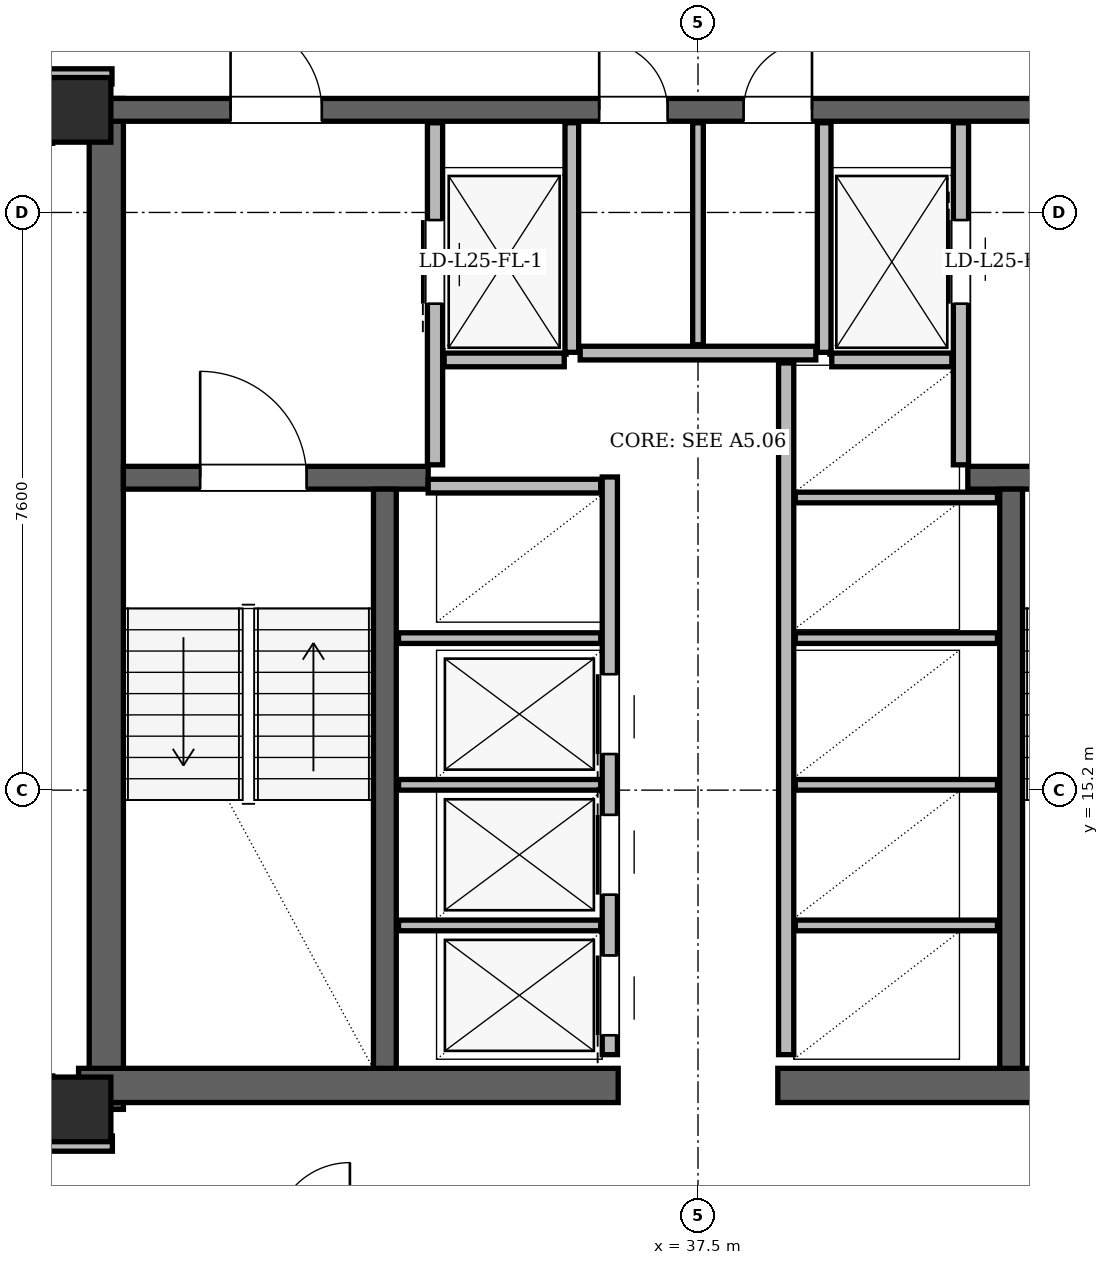
"""IFC4 building model, lengths in metres.
Left out: names, types, materials, properties, quantities, classifications, styles, units other than length and angle.
Written with IfcOpenShell. Run it as: python <this file> out.ifc"""

import sys

from ifc_helpers import new_model, si_unit, direction, frame, frame_2d, origin, origin_2d, place, context, subcontext, project, spatial, rectangle, hollow_rectangle, extrude, element, fill, save


model = new_model("IFC4")
c1 = context("Model", 3, precision=1e-05, world=origin(), true_north=direction((0.0, 1.0)))
c2 = subcontext(c1, "Body", "Model", "MODEL_VIEW")
j1 = project(units=[si_unit("LENGTHUNIT", "METRE"), si_unit("PLANEANGLEUNIT", "RADIAN")], contexts=[c1])
p1 = place(None, origin())
s1 = spatial("IfcSite", under=j1, at=p1, CompositionType="ELEMENT")
p2 = place(p1, origin())
s2 = spatial("IfcBuilding", under=s1, at=p2, CompositionType="ELEMENT")
p3 = place(p2, frame((0.0, 0.0, 96.9)))
s3 = spatial("IfcBuildingStorey", under=s2, at=p3, CompositionType="ELEMENT", Elevation=96.9)
for number, where, z_axis, x_axis in (
    (1, (29.35, 11.0, 0.0), (0.0, 0.0, 1.0), (1.0, 0.0, 0.0)),
    (2, (29.35, 24.15, 0.0), (0.0, 0.0, 1.0), (1.0, 0.0, 0.0)),
):
    element("IfcColumn", number, at=place(p3, frame(where, z_axis=z_axis, x_axis=x_axis)), inside=s3, PredefinedType="COLUMN", context=c2, shape_type="SweptSolid", body=[
        extrude(hollow_rectangle(XDim=0.85, YDim=0.85, WallThickness=0.07, at=origin_2d()), origin(), (0.0, 0.0, 1.0), 3.6),
    ])
p4 = place(p3, frame((29.715, 11.0, 0.0), z_axis=(0.0, 0.0, 1.0), x_axis=(0.0, 1.0, 0.0)))
e3 = element("IfcWall", 3, at=p4, inside=s3, PredefinedType="SHEAR", context=c2, shape_type="SweptSolid", body=[
    extrude(rectangle(XDim=13.3, YDim=0.45, at=frame_2d((6.65, 0.0))), origin(), (0.0, 0.0, 1.0), 3.36),
])
for number, where, z_axis, x_axis in (
    (4, (29.35, 11.315, 0.0), (0.0, 0.0, 1.0), (1.0, 0.0, 0.0)),
    (5, (38.55, 11.315, 0.0), (0.0, 0.0, 1.0), (1.0, 0.0, 0.0)),
):
    element("IfcWall", number, at=place(p3, frame(where, z_axis=z_axis, x_axis=x_axis)), inside=s3, PredefinedType="SHEAR", context=c2, shape_type="SweptSolid", body=[
        extrude(rectangle(XDim=7.1, YDim=0.45, at=frame_2d((3.55, 0.0))), origin(), (0.0, 0.0, 1.0), 3.36),
    ])
p5 = place(p3, frame((29.65, 24.15, 0.0), z_axis=(0.0, 0.0, 1.0), x_axis=(1.0, 0.0, 0.0)))
e6 = element("IfcWall", 6, at=p5, inside=s3, PredefinedType="SHEAR", context=c2, shape_type="SweptSolid", body=[
    extrude(rectangle(XDim=15.7, YDim=0.3, at=frame_2d((7.85, 0.0))), origin(), (0.0, 0.0, 1.0), 3.36),
])
p6 = place(p5, frame((1.7, 0.0, 0.0)))
e7 = element("IfcOpeningElement", 7, at=p6, cuts=e6, PredefinedType="OPENING", context=c2, shape_type="SweptSolid", body=[
    extrude(rectangle(XDim=1.2, YDim=2.2, at=frame_2d((0.6, 1.1))), frame((0.0, 0.15, 0.0), z_axis=(0.0, -1.0, 0.0), x_axis=(1.0, 0.0, 0.0)), (0.0, 0.0, 1.0), 0.3),
])
p7 = place(p5, frame((12.8, 0.0, 0.0)))
e8 = element("IfcOpeningElement", 8, at=p7, cuts=e6, PredefinedType="OPENING", context=c2, shape_type="SweptSolid", body=[
    extrude(rectangle(XDim=1.2, YDim=2.2, at=frame_2d((0.6, 1.1))), frame((0.0, 0.15, 0.0), z_axis=(0.0, -1.0, 0.0), x_axis=(1.0, 0.0, 0.0)), (0.0, 0.0, 1.0), 0.3),
])
p8 = place(p5, frame((6.55, 0.0, 0.0)))
e9 = element("IfcOpeningElement", 9, at=p8, cuts=e6, PredefinedType="OPENING", context=c2, shape_type="SweptSolid", body=[
    extrude(rectangle(XDim=0.9, YDim=2.05, at=frame_2d((0.45, 1.025))), frame((0.0, 0.15, 0.0), z_axis=(0.0, -1.0, 0.0), x_axis=(1.0, 0.0, 0.0)), (0.0, 0.0, 1.0), 0.3),
])
p9 = place(p5, frame((8.45, 0.0, 0.0)))
e10 = element("IfcOpeningElement", 10, at=p9, cuts=e6, PredefinedType="OPENING", context=c2, shape_type="SweptSolid", body=[
    extrude(rectangle(XDim=0.9, YDim=2.05, at=frame_2d((0.45, 1.025))), frame((0.0, 0.15, 0.0), z_axis=(0.0, -1.0, 0.0), x_axis=(1.0, 0.0, 0.0)), (0.0, 0.0, 1.0), 0.3),
])
p10 = place(p3, frame((29.94, 19.31, 0.0), z_axis=(0.0, 0.0, 1.0), x_axis=(1.0, 0.0, 0.0)))
e11 = element("IfcWall", 11, at=p10, inside=s3, PredefinedType="SHEAR", context=c2, shape_type="SweptSolid", body=[
    extrude(rectangle(XDim=4.01, YDim=0.3, at=frame_2d((2.005, 0.0))), origin(), (0.0, 0.0, 1.0), 3.36),
])
p11 = place(p10, frame((1.01, 0.0, 0.0)))
e12 = element("IfcOpeningElement", 12, at=p11, cuts=e11, PredefinedType="OPENING", context=c2, shape_type="SweptSolid", body=[
    extrude(rectangle(XDim=1.4, YDim=2.2, at=frame_2d((0.7, 1.1))), frame((0.0, 0.15, 0.0), z_axis=(0.0, -1.0, 0.0), x_axis=(1.0, 0.0, 0.0)), (0.0, 0.0, 1.0), 0.3),
])
p12 = place(p3, frame((41.05, 19.31, 0.0), z_axis=(0.0, 0.0, 1.0), x_axis=(1.0, 0.0, 0.0)))
e13 = element("IfcWall", 13, at=p12, inside=s3, PredefinedType="SHEAR", context=c2, shape_type="SweptSolid", body=[
    extrude(rectangle(XDim=4.01, YDim=0.3, at=frame_2d((2.005, 0.0))), origin(), (0.0, 0.0, 1.0), 3.36),
])
p13 = place(p12, frame((1.6, 0.0, 0.0)))
e14 = element("IfcOpeningElement", 14, at=p13, cuts=e13, PredefinedType="OPENING", context=c2, shape_type="SweptSolid", body=[
    extrude(rectangle(XDim=1.4, YDim=2.2, at=frame_2d((0.7, 1.1))), frame((0.0, 0.15, 0.0), z_axis=(0.0, -1.0, 0.0), x_axis=(1.0, 0.0, 0.0)), (0.0, 0.0, 1.0), 0.3),
])
for number, where, z_axis, x_axis in (
    (15, (33.38, 11.54, 0.0), (0.0, 0.0, 1.0), (0.0, 1.0, 0.0)),
    (16, (41.62, 11.54, 0.0), (0.0, 0.0, 1.0), (0.0, 1.0, 0.0)),
):
    element("IfcWall", number, at=place(p3, frame(where, z_axis=z_axis, x_axis=x_axis)), inside=s3, PredefinedType="SHEAR", context=c2, shape_type="SweptSolid", body=[
        extrude(rectangle(XDim=7.62, YDim=0.3, at=frame_2d((3.81, 0.0))), origin(), (0.0, 0.0, 1.0), 3.36),
    ])
p14 = place(p3, frame((31.472, 43.462, 0.0), z_axis=(0.0, 0.0, 1.0), x_axis=(-0.499995749028, -0.86602785807, 0.0)))
e17 = element("IfcWall", 17, at=p14, inside=s3, PredefinedType="SOLIDWALL", context=c2, shape_type="SweptSolid", body=[
    extrude(rectangle(XDim=34.437, YDim=0.34, at=frame_2d((17.218, 0.0))), origin(), (0.0, 0.0, 1.0), 2.578),
])
p15 = place(p14, frame((6.469, 0.0, 0.0)))
e18 = element("IfcOpeningElement", 18, at=p15, cuts=e17, PredefinedType="OPENING", context=c2, shape_type="SweptSolid", body=[
    extrude(rectangle(XDim=1.3, YDim=2.2, at=frame_2d((0.65, 1.1))), frame((0.0, 0.17, 0.0), z_axis=(0.0, -1.0, 0.0), x_axis=(1.0, 0.0, 0.0)), (0.0, 0.0, 1.0), 0.34),
])
p16 = place(p14, frame((24.902, 0.0, 0.0)))
e19 = element("IfcOpeningElement", 19, at=p16, cuts=e17, PredefinedType="OPENING", context=c2, shape_type="SweptSolid", body=[
    extrude(rectangle(XDim=1.5, YDim=2.2, at=frame_2d((0.75, 1.1))), frame((0.0, 0.17, 0.0), z_axis=(0.0, -1.0, 0.0), x_axis=(1.0, 0.0, 0.0)), (0.0, 0.0, 1.0), 0.34),
])
p17 = place(p14, frame((30.75, 0.0, 0.85)))
e20 = element("IfcOpeningElement", 20, at=p17, cuts=e17, PredefinedType="OPENING", context=c2, shape_type="SweptSolid", body=[
    extrude(rectangle(XDim=1.4, YDim=1.6, at=frame_2d((0.7, 0.8))), frame((0.0, 0.17, 0.0), z_axis=(0.0, -1.0, 0.0), x_axis=(1.0, 0.0, 0.0)), (0.0, 0.0, 1.0), 0.34),
])
p18 = place(p14, frame((11.337, 0.0, 0.85)))
e21 = element("IfcOpeningElement", 21, at=p18, cuts=e17, PredefinedType="OPENING", context=c2, shape_type="SweptSolid", body=[
    extrude(rectangle(XDim=2.8, YDim=1.618, at=frame_2d((1.4, 0.809))), frame((0.0, 0.17, 0.0), z_axis=(0.0, -1.0, 0.0), x_axis=(1.0, 0.0, 0.0)), (0.0, 0.0, 1.0), 0.34),
])
p19 = place(p14, frame((18.111, 0.0, 0.85)))
e22 = element("IfcOpeningElement", 22, at=p19, cuts=e17, PredefinedType="OPENING", context=c2, shape_type="SweptSolid", body=[
    extrude(rectangle(XDim=2.2, YDim=1.618, at=frame_2d((1.1, 0.809))), frame((0.0, 0.17, 0.0), z_axis=(0.0, -1.0, 0.0), x_axis=(1.0, 0.0, 0.0)), (0.0, 0.0, 1.0), 0.34),
])
p20 = place(p14, frame((3.044, 0.0, 0.85)))
e23 = element("IfcOpeningElement", 23, at=p20, cuts=e17, PredefinedType="OPENING", context=c2, shape_type="SweptSolid", body=[
    extrude(rectangle(XDim=1.2, YDim=1.48, at=frame_2d((0.6, 0.74))), frame((0.0, 0.17, 0.0), z_axis=(0.0, -1.0, 0.0), x_axis=(1.0, 0.0, 0.0)), (0.0, 0.0, 1.0), 0.34),
])
p21 = place(p3, frame((34.04, 19.48, 0.0), z_axis=(0.0, 0.0, 1.0), x_axis=(0.0, 1.0, 0.0)))
e24 = element("IfcWall", 24, at=p21, inside=s3, PredefinedType="PARTITIONING", context=c2, shape_type="SweptSolid", body=[
    extrude(rectangle(XDim=4.5, YDim=0.2, at=frame_2d((2.25, 0.0))), origin(), (0.0, 0.0, 1.0), 2.4),
])
p22 = place(p21, frame((2.12, 0.0, 0.0)))
e25 = element("IfcOpeningElement", 25, at=p22, cuts=e24, PredefinedType="OPENING", context=c2, shape_type="SweptSolid", body=[
    extrude(rectangle(XDim=1.1, YDim=2.2, at=frame_2d((0.55, 1.1))), frame((0.0, 0.1, 0.0), z_axis=(0.0, -1.0, 0.0), x_axis=(1.0, 0.0, 0.0)), (0.0, 0.0, 1.0), 0.2),
])
p23 = place(p3, frame((35.84, 20.96, 0.0), z_axis=(0.0, 0.0, 1.0), x_axis=(0.0, 1.0, 0.0)))
e26 = element("IfcWall", 26, at=p23, inside=s3, PredefinedType="PARTITIONING", context=c2, shape_type="SweptSolid", body=[
    extrude(rectangle(XDim=3.02, YDim=0.18, at=frame_2d((1.51, 0.0))), origin(), (0.0, 0.0, 1.0), 2.4),
])
p24 = place(p3, frame((34.16, 20.86, 0.0), z_axis=(0.0, 0.0, 1.0), x_axis=(1.0, 0.0, 0.0)))
e27 = element("IfcWall", 27, at=p24, inside=s3, PredefinedType="PARTITIONING", context=c2, shape_type="SweptSolid", body=[
    extrude(rectangle(XDim=1.58, YDim=0.18, at=frame_2d((0.79, 0.0))), origin(), (0.0, 0.0, 1.0), 3.36),
])
p25 = place(p3, frame((40.96, 19.48, 0.0), z_axis=(0.0, 0.0, 1.0), x_axis=(0.0, 1.0, 0.0)))
e28 = element("IfcWall", 28, at=p25, inside=s3, PredefinedType="PARTITIONING", context=c2, shape_type="SweptSolid", body=[
    extrude(rectangle(XDim=4.5, YDim=0.2, at=frame_2d((2.25, 0.0))), origin(), (0.0, 0.0, 1.0), 2.4),
])
p26 = place(p25, frame((2.12, 0.0, 0.0)))
e29 = element("IfcOpeningElement", 29, at=p26, cuts=e28, PredefinedType="OPENING", context=c2, shape_type="SweptSolid", body=[
    extrude(rectangle(XDim=1.1, YDim=2.2, at=frame_2d((0.55, 1.1))), frame((0.0, 0.1, 0.0), z_axis=(0.0, -1.0, 0.0), x_axis=(1.0, 0.0, 0.0)), (0.0, 0.0, 1.0), 0.2),
])
p27 = place(p3, frame((39.16, 20.96, 0.0), z_axis=(0.0, 0.0, 1.0), x_axis=(0.0, 1.0, 0.0)))
e30 = element("IfcWall", 30, at=p27, inside=s3, PredefinedType="PARTITIONING", context=c2, shape_type="SweptSolid", body=[
    extrude(rectangle(XDim=3.02, YDim=0.18, at=frame_2d((1.51, 0.0))), origin(), (0.0, 0.0, 1.0), 2.4),
])
p28 = place(p3, frame((39.26, 20.86, 0.0), z_axis=(0.0, 0.0, 1.0), x_axis=(1.0, 0.0, 0.0)))
e31 = element("IfcWall", 31, at=p28, inside=s3, PredefinedType="PARTITIONING", context=c2, shape_type="SweptSolid", body=[
    extrude(rectangle(XDim=1.58, YDim=0.18, at=frame_2d((0.79, 0.0))), origin(), (0.0, 0.0, 1.0), 3.36),
])
p29 = place(p3, frame((36.34, 11.72, 0.0), z_axis=(0.0, 0.0, 1.0), x_axis=(0.0, 1.0, 0.0)))
e32 = element("IfcWall", 32, at=p29, inside=s3, PredefinedType="PARTITIONING", context=c2, shape_type="SweptSolid", body=[
    extrude(rectangle(XDim=7.6, YDim=0.2, at=frame_2d((3.8, 0.0))), origin(), (0.0, 0.0, 1.0), 3.36),
])
p30 = place(p29, frame((0.255, 0.0, 0.0)))
e33 = element("IfcOpeningElement", 33, at=p30, cuts=e32, PredefinedType="OPENING", context=c2, shape_type="SweptSolid", body=[
    extrude(rectangle(XDim=1.05, YDim=2.15, at=frame_2d((0.525, 1.075))), frame((0.0, 0.1, 0.0), z_axis=(0.0, -1.0, 0.0), x_axis=(1.0, 0.0, 0.0)), (0.0, 0.0, 1.0), 0.2),
])
p31 = place(p29, frame((2.105, 0.0, 0.0)))
e34 = element("IfcOpeningElement", 34, at=p31, cuts=e32, PredefinedType="OPENING", context=c2, shape_type="SweptSolid", body=[
    extrude(rectangle(XDim=1.05, YDim=2.15, at=frame_2d((0.525, 1.075))), frame((0.0, 0.1, 0.0), z_axis=(0.0, -1.0, 0.0), x_axis=(1.0, 0.0, 0.0)), (0.0, 0.0, 1.0), 0.2),
])
p32 = place(p29, frame((3.955, 0.0, 0.0)))
e35 = element("IfcOpeningElement", 35, at=p32, cuts=e32, PredefinedType="OPENING", context=c2, shape_type="SweptSolid", body=[
    extrude(rectangle(XDim=1.05, YDim=2.15, at=frame_2d((0.525, 1.075))), frame((0.0, 0.1, 0.0), z_axis=(0.0, -1.0, 0.0), x_axis=(1.0, 0.0, 0.0)), (0.0, 0.0, 1.0), 0.2),
])
p33 = place(p3, frame((33.95, 19.2, 0.0), z_axis=(0.0, 0.0, 1.0), x_axis=(1.0, 0.0, 0.0)))
e36 = element("IfcWall", 36, at=p33, inside=s3, PredefinedType="PARTITIONING", context=c2, shape_type="SweptSolid", body=[
    extrude(rectangle(XDim=2.27, YDim=0.18, at=frame_2d((1.135, 0.0))), origin(), (0.0, 0.0, 1.0), 3.36),
])
for number, where, z_axis, x_axis in (
    (37, (33.56, 13.42, 0.0), (0.0, 0.0, 1.0), (1.0, 0.0, 0.0)),
    (38, (33.56, 15.27, 0.0), (0.0, 0.0, 1.0), (1.0, 0.0, 0.0)),
    (39, (33.56, 17.2, 0.0), (0.0, 0.0, 1.0), (1.0, 0.0, 0.0)),
):
    element("IfcWall", number, at=place(p3, frame(where, z_axis=z_axis, x_axis=x_axis)), inside=s3, PredefinedType="PARTITIONING", context=c2, shape_type="SweptSolid", body=[
        extrude(rectangle(XDim=2.66, YDim=0.14, at=frame_2d((1.33, 0.0))), origin(), (0.0, 0.0, 1.0), 3.36),
    ])
p34 = place(p3, frame((38.66, 11.72, 0.0), z_axis=(0.0, 0.0, 1.0), x_axis=(0.0, 1.0, 0.0)))
e40 = element("IfcWall", 40, at=p34, inside=s3, PredefinedType="PARTITIONING", context=c2, shape_type="SweptSolid", body=[
    extrude(rectangle(XDim=9.1, YDim=0.2, at=frame_2d((4.55, 0.0))), origin(), (0.0, 0.0, 1.0), 3.36),
])
for number, where, z_axis, x_axis in (
    (41, (38.78, 13.42, 0.0), (0.0, 0.0, 1.0), (1.0, 0.0, 0.0)),
    (42, (38.78, 15.27, 0.0), (0.0, 0.0, 1.0), (1.0, 0.0, 0.0)),
    (43, (38.78, 17.2, 0.0), (0.0, 0.0, 1.0), (1.0, 0.0, 0.0)),
    (44, (38.78, 19.05, 0.0), (0.0, 0.0, 1.0), (1.0, 0.0, 0.0)),
):
    element("IfcWall", number, at=place(p3, frame(where, z_axis=z_axis, x_axis=x_axis)), inside=s3, PredefinedType="PARTITIONING", context=c2, shape_type="SweptSolid", body=[
        extrude(rectangle(XDim=2.66, YDim=0.14, at=frame_2d((1.33, 0.0))), origin(), (0.0, 0.0, 1.0), 3.36),
    ])
p35 = place(p3, frame((35.95, 20.95, 0.0), z_axis=(0.0, 0.0, 1.0), x_axis=(1.0, 0.0, 0.0)))
e45 = element("IfcWall", 45, at=p35, inside=s3, PredefinedType="PARTITIONING", context=c2, shape_type="SweptSolid", body=[
    extrude(rectangle(XDim=3.1, YDim=0.18, at=frame_2d((1.55, 0.0))), origin(), (0.0, 0.0, 1.0), 3.36),
])
p36 = place(p3, frame((37.5, 21.06, 0.0), z_axis=(0.0, 0.0, 1.0), x_axis=(0.0, 1.0, 0.0)))
e46 = element("IfcWall", 46, at=p36, inside=s3, PredefinedType="PARTITIONING", context=c2, shape_type="SweptSolid", body=[
    extrude(rectangle(XDim=2.92, YDim=0.14, at=frame_2d((1.46, 0.0))), origin(), (0.0, 0.0, 1.0), 2.4),
])
p37 = place(p3, frame((28.905, 10.55, 0.0), z_axis=(0.0, 0.0, 1.0), x_axis=(1.0, 0.0, 0.0)))
e47 = element("IfcWall", 47, at=p37, inside=s3, PredefinedType="PARTITIONING", context=c2, shape_type="SweptSolid", body=[
    extrude(rectangle(XDim=0.89, YDim=0.2, at=frame_2d((0.445, 0.0))), origin(), (0.0, 0.0, 1.0), 3.36),
])
p38 = place(p3, frame((28.91, 24.59, 0.0), z_axis=(0.0, 0.0, 1.0), x_axis=(1.0, 0.0, 0.0)))
e48 = element("IfcWall", 48, at=p38, inside=s3, PredefinedType="PARTITIONING", context=c2, shape_type="SweptSolid", body=[
    extrude(rectangle(XDim=0.88, YDim=0.2, at=frame_2d((0.44, 0.0))), origin(), (0.0, 0.0, 1.0), 2.814),
])
p39 = place(p3, frame((28.91, 10.654, 0.0), z_axis=(0.0, 0.0, 1.0), x_axis=(0.0, 1.0, 0.0)))
e49 = element("IfcWall", 49, at=p39, inside=s3, PredefinedType="PARTITIONING", context=c2, shape_type="SweptSolid", body=[
    extrude(rectangle(XDim=0.786, YDim=0.2, at=frame_2d((0.393, 0.0))), origin(), (0.0, 0.0, 1.0), 2.814),
])
p40 = place(p3, frame((28.91, 23.71, 0.0), z_axis=(0.0, 0.0, 1.0), x_axis=(0.0, 1.0, 0.0)))
e50 = element("IfcWall", 50, at=p40, inside=s3, PredefinedType="PARTITIONING", context=c2, shape_type="SweptSolid", body=[
    extrude(rectangle(XDim=0.61, YDim=0.2, at=frame_2d((0.305, 0.0))), origin(), (0.0, 0.0, 1.0), 3.36),
])
p41 = place(p22, origin())
e51 = element("IfcDoor", 51, at=p41, inside=s3, OperationType="SLIDING_TO_LEFT", PredefinedType="DOOR", context=c2, shape_type="SweptSolid", body=[
    extrude(rectangle(XDim=1.1, YDim=2.2, at=frame_2d((0.55, 1.1))), frame((0.0, 0.025, 0.0), z_axis=(0.0, -1.0, 0.0), x_axis=(1.0, 0.0, 0.0)), (0.0, 0.0, 1.0), 0.05),
])
fill(e25, e51)
p42 = place(p26, origin())
e52 = element("IfcDoor", 52, at=p42, inside=s3, OperationType="SLIDING_TO_RIGHT", PredefinedType="DOOR", context=c2, shape_type="SweptSolid", body=[
    extrude(rectangle(XDim=1.1, YDim=2.2, at=frame_2d((0.55, 1.1))), frame((0.0, 0.025, 0.0), z_axis=(0.0, -1.0, 0.0), x_axis=(1.0, 0.0, 0.0)), (0.0, 0.0, 1.0), 0.05),
])
fill(e29, e52)
p43 = place(p30, origin())
e53 = element("IfcDoor", 53, at=p43, inside=s3, OperationType="SLIDING_TO_LEFT", PredefinedType="DOOR", context=c2, shape_type="SweptSolid", body=[
    extrude(rectangle(XDim=1.05, YDim=2.15, at=frame_2d((0.525, 1.075))), frame((0.0, 0.025, 0.0), z_axis=(0.0, -1.0, 0.0), x_axis=(1.0, 0.0, 0.0)), (0.0, 0.0, 1.0), 0.05),
])
fill(e33, e53)
p44 = place(p31, origin())
e54 = element("IfcDoor", 54, at=p44, inside=s3, OperationType="SLIDING_TO_RIGHT", PredefinedType="DOOR", context=c2, shape_type="SweptSolid", body=[
    extrude(rectangle(XDim=1.05, YDim=2.15, at=frame_2d((0.525, 1.075))), frame((0.0, 0.025, 0.0), z_axis=(0.0, -1.0, 0.0), x_axis=(1.0, 0.0, 0.0)), (0.0, 0.0, 1.0), 0.05),
])
fill(e34, e54)
p45 = place(p32, origin())
e55 = element("IfcDoor", 55, at=p45, inside=s3, OperationType="SLIDING_TO_LEFT", PredefinedType="DOOR", context=c2, shape_type="SweptSolid", body=[
    extrude(rectangle(XDim=1.05, YDim=2.15, at=frame_2d((0.525, 1.075))), frame((0.0, 0.025, 0.0), z_axis=(0.0, -1.0, 0.0), x_axis=(1.0, 0.0, 0.0)), (0.0, 0.0, 1.0), 0.05),
])
fill(e35, e55)
p46 = place(p11, origin())
e56 = element("IfcDoor", 56, at=p46, inside=s3, OperationType="SINGLE_SWING_LEFT", PredefinedType="DOOR", context=c2, shape_type="SweptSolid", body=[
    extrude(rectangle(XDim=1.4, YDim=2.2, at=frame_2d((0.7, 1.1))), frame((0.0, 0.025, 0.0), z_axis=(0.0, -1.0, 0.0), x_axis=(1.0, 0.0, 0.0)), (0.0, 0.0, 1.0), 0.05),
])
fill(e12, e56)
p47 = place(p6, origin())
e57 = element("IfcDoor", 57, at=p47, inside=s3, OperationType="SINGLE_SWING_LEFT", PredefinedType="DOOR", context=c2, shape_type="SweptSolid", body=[
    extrude(rectangle(XDim=1.2, YDim=2.2, at=frame_2d((0.6, 1.1))), frame((0.0, 0.025, 0.0), z_axis=(0.0, -1.0, 0.0), x_axis=(1.0, 0.0, 0.0)), (0.0, 0.0, 1.0), 0.05),
])
fill(e7, e57)
p48 = place(p8, origin())
e58 = element("IfcDoor", 58, at=p48, inside=s3, OperationType="SINGLE_SWING_LEFT", PredefinedType="DOOR", context=c2, shape_type="SweptSolid", body=[
    extrude(rectangle(XDim=0.9, YDim=2.05, at=frame_2d((0.45, 1.025))), frame((0.0, 0.025, 0.0), z_axis=(0.0, -1.0, 0.0), x_axis=(1.0, 0.0, 0.0)), (0.0, 0.0, 1.0), 0.05),
])
fill(e9, e58)
p49 = place(p9, origin())
e59 = element("IfcDoor", 59, at=p49, inside=s3, OperationType="SINGLE_SWING_RIGHT", PredefinedType="DOOR", context=c2, shape_type="SweptSolid", body=[
    extrude(rectangle(XDim=0.9, YDim=2.05, at=frame_2d((0.45, 1.025))), frame((0.0, 0.025, 0.0), z_axis=(0.0, -1.0, 0.0), x_axis=(1.0, 0.0, 0.0)), (0.0, 0.0, 1.0), 0.05),
])
fill(e10, e59)
save(model, sys.argv[1])
